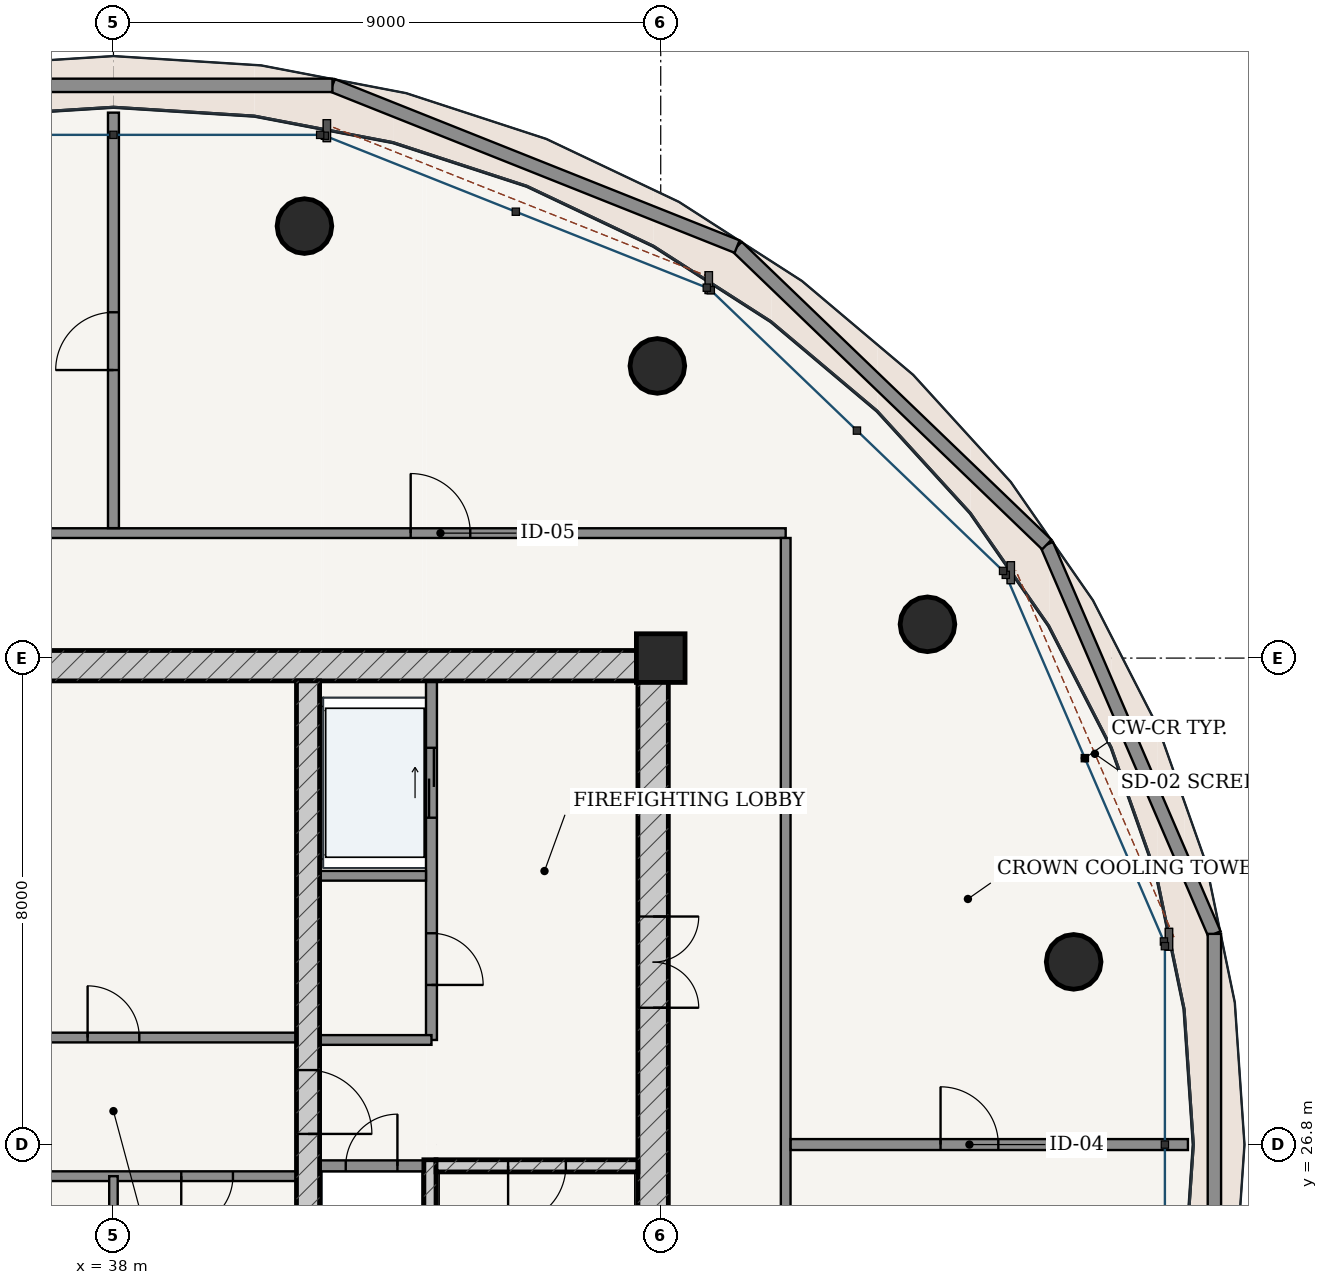
"""IFC4 building model, lengths in metres.
Left out: names, types, materials, properties, quantities, classifications, styles, units other than length and angle.
Written with IfcOpenShell. Run it as: python <this file> out.ifc"""

import sys

from ifc_helpers import new_model, si_unit, direction, frame, frame_2d, origin, origin_2d, place, context, subcontext, project, spatial, rectangle, hollow_circle, extrude, source, transform, mapped, element, fill, save


model = new_model("IFC4")
c1 = context("Model", 3, precision=1e-05, world=origin(), true_north=direction((-0.2419218956, 0.970295726276)))
c2 = subcontext(c1, "Body", "Model", "MODEL_VIEW")
j1 = project(units=[si_unit("LENGTHUNIT", "METRE"), si_unit("PLANEANGLEUNIT", "RADIAN")], contexts=[c1])
p1 = place(None, origin())
s1 = spatial("IfcSite", under=j1, at=p1, CompositionType="ELEMENT")
p2 = place(p1, origin())
s2 = spatial("IfcBuilding", under=s1, at=p2, CompositionType="ELEMENT")
p3 = place(p2, frame((0.0, 0.0, 306.1)))
s3 = spatial("IfcBuildingStorey", under=s2, at=p3, CompositionType="ELEMENT", Elevation=306.1)
p4 = place(p3, frame((47.0, 34.8, 0.0), z_axis=(0.0, 0.0, 1.0), x_axis=(1.0, 0.0, 0.0)))
e1 = element("IfcColumn", 1, at=p4, inside=s3, PredefinedType="COLUMN", context=c2, shape_type="SweptSolid", body=[
    extrude(rectangle(XDim=0.8, YDim=0.8, at=origin_2d()), origin(), (0.0, 0.0, 1.0), 5.2),
])
p5 = place(p3, frame((28.875, 34.675, 0.0), z_axis=(0.0, 0.0, 1.0), x_axis=(1.0, 0.0, 0.0)))
e2 = element("IfcWall", 2, at=p5, inside=s3, PredefinedType="SHEAR", context=c2, shape_type="SweptSolid", body=[
    extrude(rectangle(XDim=18.25, YDim=0.5, at=frame_2d((9.125, 0.0))), origin(), (0.0, 0.0, 1.0), 4.78),
])
p6 = place(p3, frame((46.875, 19.175, 0.0), z_axis=(0.0, 0.0, 1.0), x_axis=(0.0, 1.0, 0.0)))
e3 = element("IfcWall", 3, at=p6, inside=s3, PredefinedType="SHEAR", context=c2, shape_type="SweptSolid", body=[
    extrude(rectangle(XDim=15.25, YDim=0.5, at=frame_2d((7.625, 0.0))), origin(), (0.0, 0.0, 1.0), 4.78),
])
p7 = place(p6, frame((9.875, 0.0, 0.0)))
e4 = element("IfcOpeningElement", 4, at=p7, cuts=e3, PredefinedType="OPENING", context=c2, shape_type="SweptSolid", body=[
    extrude(rectangle(XDim=1.5, YDim=2.2, at=frame_2d((0.75, 1.1))), frame((0.0, 0.26, 0.0), z_axis=(0.0, -1.0, 0.0), x_axis=(1.0, 0.0, 0.0)), (0.0, 0.0, 1.0), 0.52),
])
p8 = place(p3, frame((43.205, 19.175, 0.0), z_axis=(0.0, 0.0, 1.0), x_axis=(0.0, 1.0, 0.0)))
e5 = element("IfcWall", 5, at=p8, inside=s3, PredefinedType="SOLIDWALL", context=c2, shape_type="SweptSolid", body=[
    extrude(rectangle(XDim=7.375, YDim=0.2, at=frame_2d((3.688, 0.0))), origin(), (0.0, 0.0, 1.0), 4.78),
])
p9 = place(p3, frame((43.305, 26.45, 0.0), z_axis=(0.0, 0.0, 1.0), x_axis=(1.0, 0.0, 0.0)))
e6 = element("IfcWall", 6, at=p9, inside=s3, PredefinedType="SOLIDWALL", context=c2, shape_type="SweptSolid", body=[
    extrude(rectangle(XDim=3.32, YDim=0.2, at=frame_2d((1.66, 0.0))), origin(), (0.0, 0.0, 1.0), 4.78),
])
p10 = place(p9, frame((1.185, 0.0, 0.0)))
e7 = element("IfcOpeningElement", 7, at=p10, cuts=e6, PredefinedType="OPENING", context=c2, shape_type="SweptSolid", body=[
    extrude(rectangle(XDim=0.95, YDim=2.15, at=frame_2d((0.475, 1.075))), frame((0.0, 0.11, 0.0), z_axis=(0.0, -1.0, 0.0), x_axis=(1.0, 0.0, 0.0)), (0.0, 0.0, 1.0), 0.22),
])
p11 = place(p3, frame((41.2, 19.175, 0.0), z_axis=(0.0, 0.0, 1.0), x_axis=(0.0, 1.0, 0.0)))
e8 = element("IfcWall", 8, at=p11, inside=s3, PredefinedType="SHEAR", context=c2, shape_type="SweptSolid", body=[
    extrude(rectangle(XDim=15.25, YDim=0.38, at=frame_2d((7.625, 0.0))), origin(), (0.0, 0.0, 1.0), 4.78),
])
p12 = place(p11, frame((7.8, 0.0, 0.0)))
e9 = element("IfcOpeningElement", 9, at=p12, cuts=e8, PredefinedType="OPENING", context=c2, shape_type="SweptSolid", body=[
    extrude(rectangle(XDim=1.05, YDim=2.15, at=frame_2d((0.525, 1.075))), frame((0.0, 0.2, 0.0), z_axis=(0.0, -1.0, 0.0), x_axis=(1.0, 0.0, 0.0)), (0.0, 0.0, 1.0), 0.4),
])
for number, where, z_axis, x_axis in (
    (10, (53.791, 29.804, 0.0), (0.0, 0.0, 1.0), (1.0, 0.0, 0.0)),
    (11, (51.387, 35.356, 0.0), (0.0, 0.0, 1.0), (1.0, 0.0, 0.0)),
    (12, (46.945, 39.605, 0.0), (0.0, 0.0, 1.0), (1.0, 0.0, 0.0)),
    (13, (41.141, 41.904, 0.0), (0.0, 0.0, 1.0), (1.0, 0.0, 0.0)),
):
    element("IfcColumn", number, at=place(p3, frame(where, z_axis=z_axis, x_axis=x_axis)), inside=s3, PredefinedType="COLUMN", context=c2, shape_type="SweptSolid", body=[
        extrude(hollow_circle(Radius=0.45, WallThickness=0.032, at=origin_2d()), origin(), (0.0, 0.0, 1.0), 5.2),
    ])
p13 = place(p3, frame((56.105, 30.265, 0.0), z_axis=(0.0, 0.0, 1.0), x_axis=(-0.39544480712, 0.918489741109, 0.0)))
e14 = element("IfcWall", 14, at=p13, inside=s3, PredefinedType="PARAPET", context=c2, shape_type="SweptSolid", body=[
    extrude(rectangle(XDim=6.97, YDim=0.22, at=frame_2d((3.485, 0.0))), origin(), (0.0, 0.0, 1.0), 1.15),
])
p14 = place(p3, frame((53.349, 36.667, 0.0), z_axis=(0.0, 0.0, 1.0), x_axis=(-0.720637211965, 0.693312345723, 0.0)))
e15 = element("IfcWall", 15, at=p14, inside=s3, PredefinedType="PARAPET", context=c2, shape_type="SweptSolid", body=[
    extrude(rectangle(XDim=7.067, YDim=0.22, at=frame_2d((3.534, 0.0))), origin(), (0.0, 0.0, 1.0), 1.15),
])
p15 = place(p3, frame((48.256, 41.567, 0.0), z_axis=(0.0, 0.0, 1.0), x_axis=(-0.928955406434, 0.370191643419, 0.0)))
e16 = element("IfcWall", 16, at=p15, inside=s3, PredefinedType="PARAPET", context=c2, shape_type="SweptSolid", body=[
    extrude(rectangle(XDim=7.164, YDim=0.22, at=frame_2d((3.582, 0.0))), origin(), (0.0, 0.0, 1.0), 1.15),
])
p16 = place(p3, frame((41.601, 44.219, 0.0), z_axis=(0.0, 0.0, 1.0), x_axis=(-1.0, 0.0, 0.0)))
e17 = element("IfcWall", 17, at=p16, inside=s3, PredefinedType="PARAPET", context=c2, shape_type="SweptSolid", body=[
    extrude(rectangle(XDim=7.203, YDim=0.22, at=frame_2d((3.601, 0.0))), origin(), (0.0, 0.0, 1.0), 1.15),
])
p17 = place(p3, frame((56.105, 23.335, 0.0), z_axis=(0.0, 0.0, 1.0), x_axis=(0.0, 1.0, 0.0)))
e18 = element("IfcWall", 18, at=p17, inside=s3, PredefinedType="PARAPET", context=c2, shape_type="SweptSolid", body=[
    extrude(rectangle(XDim=6.93, YDim=0.22, at=frame_2d((3.465, 0.0))), origin(), (0.0, 0.0, 1.0), 1.15),
])
p18 = place(p3, frame((41.39, 26.45, 0.0), z_axis=(0.0, 0.0, 1.0), x_axis=(1.0, 0.0, 0.0)))
e19 = element("IfcWall", 19, at=p18, inside=s3, PredefinedType="PARTITIONING", context=c2, shape_type="SweptSolid", body=[
    extrude(rectangle(XDim=1.71, YDim=0.18, at=frame_2d((0.855, 0.0))), origin(), (0.0, 0.0, 1.0), 4.78),
])
p19 = place(p18, frame((0.43, 0.0, 0.0)))
e20 = element("IfcOpeningElement", 20, at=p19, cuts=e19, PredefinedType="OPENING", context=c2, shape_type="SweptSolid", body=[
    extrude(rectangle(XDim=0.85, YDim=2.1, at=frame_2d((0.425, 1.05))), frame((0.0, 0.1, 0.0), z_axis=(0.0, -1.0, 0.0), x_axis=(1.0, 0.0, 0.0)), (0.0, 0.0, 1.0), 0.2),
])
p20 = place(p3, frame((43.23, 28.52, 0.0), z_axis=(0.0, 0.0, 1.0), x_axis=(0.0, 1.0, 0.0)))
e21 = element("IfcWall", 21, at=p20, inside=s3, PredefinedType="PARTITIONING", context=c2, shape_type="SweptSolid", body=[
    extrude(rectangle(XDim=5.905, YDim=0.18, at=frame_2d((2.953, 0.0))), origin(), (0.0, 0.0, 1.0), 4.78),
])
p21 = place(p20, frame((0.905, 0.0, 0.0)))
e22 = element("IfcOpeningElement", 22, at=p21, cuts=e21, PredefinedType="OPENING", context=c2, shape_type="SweptSolid", body=[
    extrude(rectangle(XDim=0.85, YDim=2.1, at=frame_2d((0.425, 1.05))), frame((0.0, 0.1, 0.0), z_axis=(0.0, -1.0, 0.0), x_axis=(1.0, 0.0, 0.0)), (0.0, 0.0, 1.0), 0.2),
])
p22 = place(p20, frame((3.655, 0.0, 0.0)))
e23 = element("IfcOpeningElement", 23, at=p22, cuts=e21, PredefinedType="OPENING", context=c2, shape_type="SweptSolid", body=[
    extrude(rectangle(XDim=1.15, YDim=2.2, at=frame_2d((0.575, 1.1))), frame((0.0, 0.1, 0.0), z_axis=(0.0, -1.0, 0.0), x_axis=(1.0, 0.0, 0.0)), (0.0, 0.0, 1.0), 0.2),
])
p23 = place(p3, frame((41.39, 31.22, 0.0), z_axis=(0.0, 0.0, 1.0), x_axis=(1.0, 0.0, 0.0)))
e24 = element("IfcWall", 24, at=p23, inside=s3, PredefinedType="PARTITIONING", context=c2, shape_type="SweptSolid", body=[
    extrude(rectangle(XDim=1.75, YDim=0.16, at=frame_2d((0.875, 0.0))), origin(), (0.0, 0.0, 1.0), 4.78),
])
p24 = place(p3, frame((41.39, 28.52, 0.0), z_axis=(0.0, 0.0, 1.0), x_axis=(1.0, 0.0, 0.0)))
e25 = element("IfcWall", 25, at=p24, inside=s3, PredefinedType="PARTITIONING", context=c2, shape_type="SweptSolid", body=[
    extrude(rectangle(XDim=1.84, YDim=0.16, at=frame_2d((0.92, 0.0))), origin(), (0.0, 0.0, 1.0), 4.78),
])
p25 = place(p3, frame((34.99, 28.56, 0.0), z_axis=(0.0, 0.0, 1.0), x_axis=(1.0, 0.0, 0.0)))
e26 = element("IfcWall", 26, at=p25, inside=s3, PredefinedType="PARTITIONING", context=c2, shape_type="SweptSolid", body=[
    extrude(rectangle(XDim=6.02, YDim=0.16, at=frame_2d((3.01, 0.0))), origin(), (0.0, 0.0, 1.0), 4.78),
])
p26 = place(p25, frame((2.585, 0.0, 0.0)))
e27 = element("IfcOpeningElement", 27, at=p26, cuts=e26, PredefinedType="OPENING", context=c2, shape_type="SweptSolid", body=[
    extrude(rectangle(XDim=0.85, YDim=2.1, at=frame_2d((0.425, 1.05))), frame((0.0, 0.09, 0.0), z_axis=(0.0, -1.0, 0.0), x_axis=(1.0, 0.0, 0.0)), (0.0, 0.0, 1.0), 0.18),
])
p27 = place(p3, frame((34.99, 26.28, 0.0), z_axis=(0.0, 0.0, 1.0), x_axis=(1.0, 0.0, 0.0)))
e28 = element("IfcWall", 28, at=p27, inside=s3, PredefinedType="PARTITIONING", context=c2, shape_type="SweptSolid", body=[
    extrude(rectangle(XDim=6.02, YDim=0.16, at=frame_2d((3.01, 0.0))), origin(), (0.0, 0.0, 1.0), 4.78),
])
p28 = place(p27, frame((1.045, 0.0, 0.0)))
e29 = element("IfcOpeningElement", 29, at=p28, cuts=e28, PredefinedType="OPENING", context=c2, shape_type="SweptSolid", body=[
    extrude(rectangle(XDim=0.85, YDim=2.1, at=frame_2d((0.425, 1.05))), frame((0.0, 0.09, 0.0), z_axis=(0.0, -1.0, 0.0), x_axis=(1.0, 0.0, 0.0)), (0.0, 0.0, 1.0), 0.18),
])
p29 = place(p27, frame((4.125, 0.0, 0.0)))
e30 = element("IfcOpeningElement", 30, at=p29, cuts=e28, PredefinedType="OPENING", context=c2, shape_type="SweptSolid", body=[
    extrude(rectangle(XDim=0.85, YDim=2.1, at=frame_2d((0.425, 1.05))), frame((0.0, 0.09, 0.0), z_axis=(0.0, -1.0, 0.0), x_axis=(1.0, 0.0, 0.0)), (0.0, 0.0, 1.0), 0.18),
])
p30 = place(p3, frame((38.0, 23.72, 0.0), z_axis=(0.0, 0.0, 1.0), x_axis=(0.0, 1.0, 0.0)))
e31 = element("IfcWall", 31, at=p30, inside=s3, PredefinedType="PARTITIONING", context=c2, shape_type="SweptSolid", body=[
    extrude(rectangle(XDim=2.56, YDim=0.14, at=frame_2d((1.28, 0.0))), origin(), (0.0, 0.0, 1.0), 4.78),
])
p31 = place(p3, frame((26.945, 36.855, 0.0), z_axis=(0.0, 0.0, 1.0), x_axis=(1.0, 0.0, 0.0)))
e32 = element("IfcWall", 32, at=p31, inside=s3, PredefinedType="PARTITIONING", context=c2, shape_type="SweptSolid", body=[
    extrude(rectangle(XDim=22.11, YDim=0.16, at=frame_2d((11.055, 0.0))), origin(), (0.0, 0.0, 1.0), 4.352),
])
p32 = place(p31, frame((15.943, 0.0, 0.0)))
e33 = element("IfcOpeningElement", 33, at=p32, cuts=e32, PredefinedType="OPENING", context=c2, shape_type="SweptSolid", body=[
    extrude(rectangle(XDim=0.98, YDim=2.2, at=frame_2d((0.49, 1.1))), frame((0.0, 0.09, 0.0), z_axis=(0.0, -1.0, 0.0), x_axis=(1.0, 0.0, 0.0)), (0.0, 0.0, 1.0), 0.18),
])
p33 = place(p31, frame((5.187, 0.0, 0.0)))
e34 = element("IfcOpeningElement", 34, at=p33, cuts=e32, PredefinedType="OPENING", context=c2, shape_type="SweptSolid", body=[
    extrude(rectangle(XDim=0.98, YDim=2.2, at=frame_2d((0.49, 1.1))), frame((0.0, 0.09, 0.0), z_axis=(0.0, -1.0, 0.0), x_axis=(1.0, 0.0, 0.0)), (0.0, 0.0, 1.0), 0.18),
])
p34 = place(p3, frame((49.055, 16.825, 0.0), z_axis=(0.0, 0.0, 1.0), x_axis=(0.0, 1.0, 0.0)))
e35 = element("IfcWall", 35, at=p34, inside=s3, PredefinedType="PARTITIONING", context=c2, shape_type="SweptSolid", body=[
    extrude(rectangle(XDim=19.95, YDim=0.16, at=frame_2d((9.975, 0.0))), origin(), (0.0, 0.0, 1.0), 4.352),
])
p35 = place(p3, frame((49.137, 26.8, 0.0), z_axis=(0.0, 0.0, 1.0), x_axis=(1.0, 0.0, 0.0)))
e36 = element("IfcWall", 36, at=p35, inside=s3, PredefinedType="PARTITIONING", context=c2, shape_type="SweptSolid", body=[
    extrude(rectangle(XDim=6.533, YDim=0.18, at=frame_2d((3.267, 0.0))), origin(), (0.0, 0.0, 1.0), 4.411),
])
p36 = place(p35, frame((2.465, 0.0, 0.0)))
e37 = element("IfcOpeningElement", 37, at=p36, cuts=e36, PredefinedType="OPENING", context=c2, shape_type="SweptSolid", body=[
    extrude(rectangle(XDim=0.95, YDim=2.15, at=frame_2d((0.475, 1.075))), frame((0.0, 0.1, 0.0), z_axis=(0.0, -1.0, 0.0), x_axis=(1.0, 0.0, 0.0)), (0.0, 0.0, 1.0), 0.2),
])
p37 = place(p3, frame((38.0, 36.937, 0.0), z_axis=(0.0, 0.0, 1.0), x_axis=(0.0, 1.0, 0.0)))
e38 = element("IfcWall", 38, at=p37, inside=s3, PredefinedType="PARTITIONING", context=c2, shape_type="SweptSolid", body=[
    extrude(rectangle(XDim=6.833, YDim=0.18, at=frame_2d((3.417, 0.0))), origin(), (0.0, 0.0, 1.0), 4.411),
])
p38 = place(p37, frame((2.6, 0.0, 0.0)))
e39 = element("IfcOpeningElement", 39, at=p38, cuts=e38, PredefinedType="OPENING", context=c2, shape_type="SweptSolid", body=[
    extrude(rectangle(XDim=0.95, YDim=2.15, at=frame_2d((0.475, 1.075))), frame((0.0, 0.1, 0.0), z_axis=(0.0, -1.0, 0.0), x_axis=(1.0, 0.0, 0.0)), (0.0, 0.0, 1.0), 0.2),
])
m1 = source(origin(), c2, "Body", "SweptSolid", [
    extrude(rectangle(XDim=1.5, YDim=2.2, at=frame_2d((0.75, 1.1))), frame((0.0, 0.025, 0.0), z_axis=(0.0, -1.0, 0.0), x_axis=(1.0, 0.0, 0.0)), (0.0, 0.0, 1.0), 0.05),
])
p39 = place(p7, frame((1.5, 0.0, 0.0), z_axis=(0.0, 0.0, 1.0), x_axis=(-1.0, 0.0, 0.0)))
e40 = element("IfcDoor", 40, at=p39, inside=s3, OperationType="DOUBLE_DOOR_SINGLE_SWING", PredefinedType="DOOR", context=c2, shape_type="MappedRepresentation", body=[
    mapped(m1, transform((0.0, 0.0, 0.0), scale=1.0)),
])
fill(e4, e40)
m2 = source(origin(), c2, "Body", "SweptSolid", [
    extrude(rectangle(XDim=1.05, YDim=2.15, at=frame_2d((0.525, 1.075))), frame((0.0, 0.025, 0.0), z_axis=(0.0, -1.0, 0.0), x_axis=(1.0, 0.0, 0.0)), (0.0, 0.0, 1.0), 0.05),
])
p40 = place(p12, frame((1.05, 0.0, 0.0), z_axis=(0.0, 0.0, 1.0), x_axis=(-1.0, 0.0, 0.0)))
e41 = element("IfcDoor", 41, at=p40, inside=s3, OperationType="SINGLE_SWING_RIGHT", PredefinedType="DOOR", context=c2, shape_type="MappedRepresentation", body=[
    mapped(m2, transform((0.0, 0.0, 0.0), scale=1.0)),
])
fill(e9, e41)
m3 = source(origin(), c2, "Body", "SweptSolid", [
    extrude(rectangle(XDim=0.95, YDim=2.15, at=frame_2d((0.475, 1.075))), frame((0.0, 0.025, 0.0), z_axis=(0.0, -1.0, 0.0), x_axis=(1.0, 0.0, 0.0)), (0.0, 0.0, 1.0), 0.05),
])
p41 = place(p10, frame((0.95, 0.0, 0.0), z_axis=(0.0, 0.0, 1.0), x_axis=(-1.0, 0.0, 0.0)))
e42 = element("IfcDoor", 42, at=p41, inside=s3, OperationType="SINGLE_SWING_RIGHT", PredefinedType="DOOR", context=c2, shape_type="MappedRepresentation", body=[
    mapped(m3, transform((0.0, 0.0, 0.0), scale=1.0)),
])
fill(e7, e42)
m4 = source(origin(), c2, "Body", "SweptSolid", [
    extrude(rectangle(XDim=0.85, YDim=2.1, at=frame_2d((0.425, 1.05))), frame((0.0, 0.025, 0.0), z_axis=(0.0, -1.0, 0.0), x_axis=(1.0, 0.0, 0.0)), (0.0, 0.0, 1.0), 0.05),
])
p42 = place(p19, origin())
e43 = element("IfcDoor", 43, at=p42, inside=s3, OperationType="SINGLE_SWING_RIGHT", PredefinedType="DOOR", context=c2, shape_type="MappedRepresentation", body=[
    mapped(m4, transform((0.0, 0.0, 0.0), scale=1.0)),
])
fill(e20, e43)
p43 = place(p21, frame((0.85, 0.0, 0.0), z_axis=(0.0, 0.0, 1.0), x_axis=(-1.0, 0.0, 0.0)))
e44 = element("IfcDoor", 44, at=p43, inside=s3, OperationType="SINGLE_SWING_RIGHT", PredefinedType="DOOR", context=c2, shape_type="MappedRepresentation", body=[
    mapped(m4, transform((0.0, 0.0, 0.0), scale=1.0)),
])
fill(e22, e44)
p44 = place(p26, origin())
e45 = element("IfcDoor", 45, at=p44, inside=s3, OperationType="SINGLE_SWING_LEFT", PredefinedType="DOOR", context=c2, shape_type="MappedRepresentation", body=[
    mapped(m4, transform((0.0, 0.0, 0.0), scale=1.0)),
])
fill(e27, e45)
p45 = place(p29, frame((0.85, 0.0, 0.0), z_axis=(0.0, 0.0, 1.0), x_axis=(-1.0, 0.0, 0.0)))
e46 = element("IfcDoor", 46, at=p45, inside=s3, OperationType="SINGLE_SWING_RIGHT", PredefinedType="DOOR", context=c2, shape_type="MappedRepresentation", body=[
    mapped(m4, transform((0.0, 0.0, 0.0), scale=1.0)),
])
fill(e30, e46)
m5 = source(origin(), c2, "Body", "SweptSolid", [
    extrude(rectangle(XDim=1.15, YDim=2.2, at=frame_2d((0.575, 1.1))), frame((0.0, 0.025, 0.0), z_axis=(0.0, -1.0, 0.0), x_axis=(1.0, 0.0, 0.0)), (0.0, 0.0, 1.0), 0.05),
])
p46 = place(p22, origin())
e47 = element("IfcDoor", 47, at=p46, inside=s3, OperationType="DOUBLE_DOOR_SLIDING", PredefinedType="DOOR", context=c2, shape_type="MappedRepresentation", body=[
    mapped(m5, transform((0.0, 0.0, 0.0), scale=1.0)),
])
fill(e23, e47)
m6 = source(origin(), c2, "Body", "SweptSolid", [
    extrude(rectangle(XDim=0.98, YDim=2.2, at=frame_2d((0.49, 1.1))), frame((0.0, 0.025, 0.0), z_axis=(0.0, -1.0, 0.0), x_axis=(1.0, 0.0, 0.0)), (0.0, 0.0, 1.0), 0.05),
])
p47 = place(p32, origin())
e48 = element("IfcDoor", 48, at=p47, inside=s3, OperationType="SINGLE_SWING_LEFT", PredefinedType="DOOR", context=c2, shape_type="MappedRepresentation", body=[
    mapped(m6, transform((0.0, 0.0, 0.0), scale=1.0)),
])
fill(e33, e48)
p48 = place(p36, origin())
e49 = element("IfcDoor", 49, at=p48, inside=s3, OperationType="SINGLE_SWING_LEFT", PredefinedType="DOOR", context=c2, shape_type="MappedRepresentation", body=[
    mapped(m3, transform((0.0, 0.0, 0.0), scale=1.0)),
])
fill(e37, e49)
p49 = place(p38, origin())
e50 = element("IfcDoor", 50, at=p49, inside=s3, OperationType="SINGLE_SWING_LEFT", PredefinedType="DOOR", context=c2, shape_type="MappedRepresentation", body=[
    mapped(m3, transform((0.0, 0.0, 0.0), scale=1.0)),
])
fill(e39, e50)
save(model, sys.argv[1])
